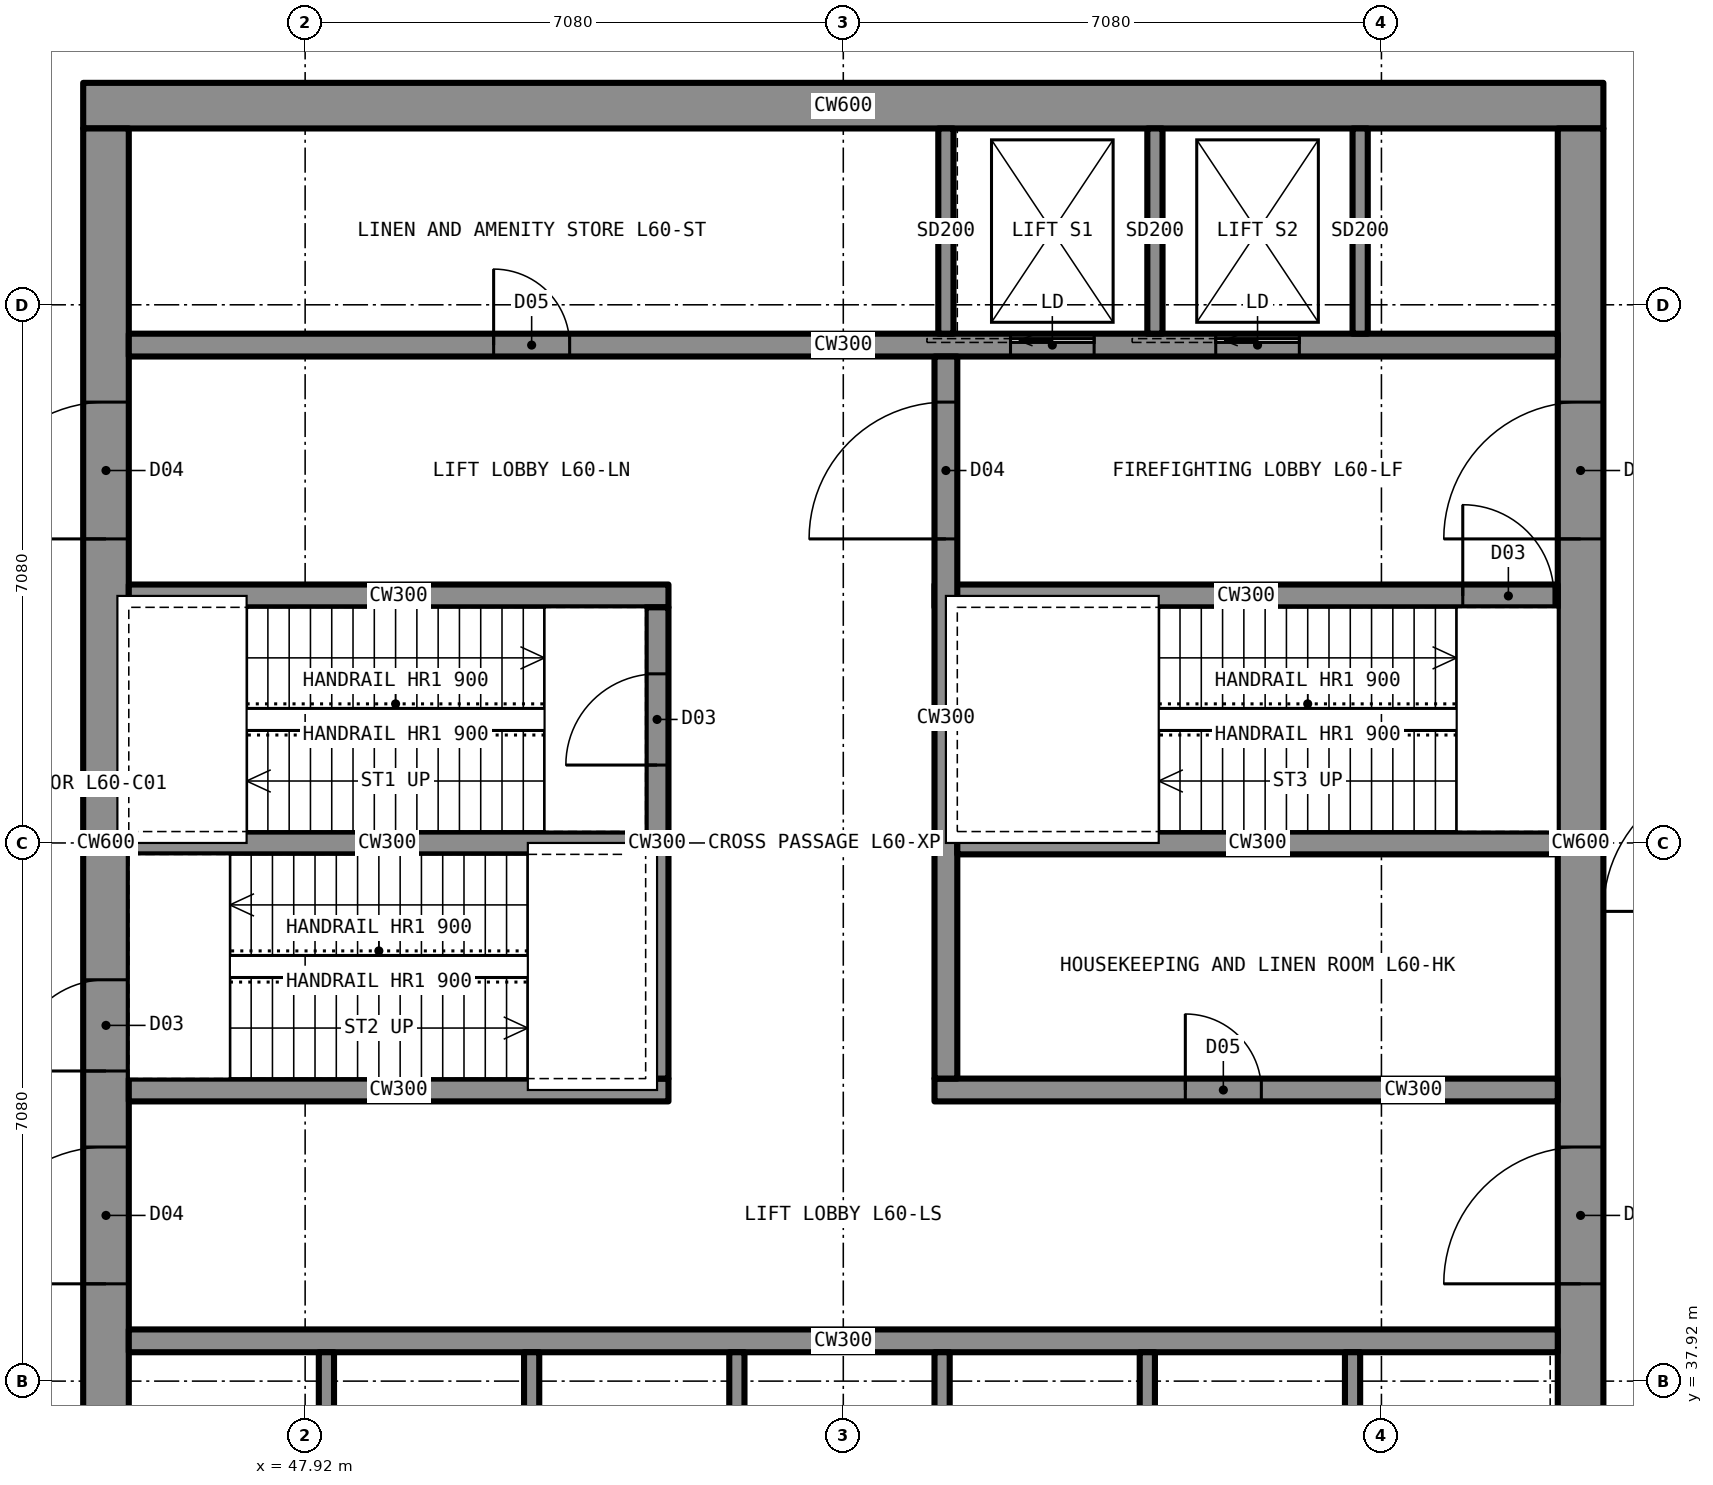
"""IFC4 building model, lengths in metres.
Left out: names, types, materials, properties, quantities, classifications, styles, units other than length and angle.
Written with IfcOpenShell. Run it as: python <this file> out.ifc"""

import sys

from ifc_helpers import new_model, si_unit, direction, frame, frame_2d, origin, place, context, subcontext, project, spatial, rectangle, extrude, element, fill, save


model = new_model("IFC4")
c1 = context("Model", 3, precision=1e-05, world=origin(), true_north=direction((0.0, 1.0)))
c2 = subcontext(c1, "Body", "Model", "MODEL_VIEW")
j1 = project(units=[si_unit("LENGTHUNIT", "METRE"), si_unit("PLANEANGLEUNIT", "RADIAN")], contexts=[c1])
p1 = place(None, origin())
s1 = spatial("IfcSite", under=j1, at=p1, CompositionType="ELEMENT")
p2 = place(p1, origin())
s2 = spatial("IfcBuilding", under=s1, at=p2, CompositionType="ELEMENT")
p3 = place(p2, frame((0.0, 0.0, 221.3)))
s3 = spatial("IfcBuildingStorey", under=s2, at=p3, CompositionType="ELEMENT", Elevation=221.3)
p4 = place(p3, frame((45.0, 54.7, 0.0), z_axis=(0.0, 0.0, 1.0), x_axis=(1.0, 0.0, 0.0)))
e1 = element("IfcWall", 1, at=p4, inside=s3, PredefinedType="SHEAR", context=c2, shape_type="SweptSolid", body=[
    extrude(rectangle(XDim=20.0, YDim=0.6, at=frame_2d((10.0, 0.0))), origin(), (0.0, 0.0, 1.0), 5.4),
])
p5 = place(p3, frame((64.7, 35.6, 0.0), z_axis=(0.0, 0.0, 1.0), x_axis=(0.0, 1.0, 0.0)))
e2 = element("IfcWall", 2, at=p5, inside=s3, PredefinedType="SHEAR", context=c2, shape_type="SweptSolid", body=[
    extrude(rectangle(XDim=18.8, YDim=0.6, at=frame_2d((9.4, 0.0))), origin(), (0.0, 0.0, 1.0), 5.4),
])
p6 = place(p5, frame((13.4, 0.0, 0.0)))
e3 = element("IfcOpeningElement", 3, at=p6, cuts=e2, PredefinedType="OPENING", context=c2, shape_type="SweptSolid", body=[
    extrude(rectangle(XDim=1.8, YDim=2.2, at=frame_2d((0.9, 1.1))), frame((0.0, 0.31, 0.0), z_axis=(0.0, -1.0, 0.0), x_axis=(1.0, 0.0, 0.0)), (0.0, 0.0, 1.0), 0.62),
])
p7 = place(p5, frame((3.6, 0.0, 0.0)))
e4 = element("IfcOpeningElement", 4, at=p7, cuts=e2, PredefinedType="OPENING", context=c2, shape_type="SweptSolid", body=[
    extrude(rectangle(XDim=1.8, YDim=2.2, at=frame_2d((0.9, 1.1))), frame((0.0, 0.31, 0.0), z_axis=(0.0, -1.0, 0.0), x_axis=(1.0, 0.0, 0.0)), (0.0, 0.0, 1.0), 0.62),
])
p8 = place(p3, frame((45.3, 35.6, 0.0), z_axis=(0.0, 0.0, 1.0), x_axis=(0.0, 1.0, 0.0)))
e5 = element("IfcWall", 5, at=p8, inside=s3, PredefinedType="SHEAR", context=c2, shape_type="SweptSolid", body=[
    extrude(rectangle(XDim=18.8, YDim=0.6, at=frame_2d((9.4, 0.0))), origin(), (0.0, 0.0, 1.0), 5.4),
])
p9 = place(p8, frame((13.4, 0.0, 0.0)))
e6 = element("IfcOpeningElement", 6, at=p9, cuts=e5, PredefinedType="OPENING", context=c2, shape_type="SweptSolid", body=[
    extrude(rectangle(XDim=1.8, YDim=2.2, at=frame_2d((0.9, 1.1))), frame((0.0, 0.31, 0.0), z_axis=(0.0, -1.0, 0.0), x_axis=(1.0, 0.0, 0.0)), (0.0, 0.0, 1.0), 0.62),
])
p10 = place(p8, frame((3.6, 0.0, 0.0)))
e7 = element("IfcOpeningElement", 7, at=p10, cuts=e5, PredefinedType="OPENING", context=c2, shape_type="SweptSolid", body=[
    extrude(rectangle(XDim=1.8, YDim=2.2, at=frame_2d((0.9, 1.1))), frame((0.0, 0.31, 0.0), z_axis=(0.0, -1.0, 0.0), x_axis=(1.0, 0.0, 0.0)), (0.0, 0.0, 1.0), 0.62),
])
p11 = place(p8, frame((6.4, 0.0, 0.0)))
e8 = element("IfcOpeningElement", 8, at=p11, cuts=e5, PredefinedType="OPENING", context=c2, shape_type="SweptSolid", body=[
    extrude(rectangle(XDim=1.2, YDim=2.2, at=frame_2d((0.6, 1.1))), frame((0.0, 0.31, 0.0), z_axis=(0.0, -1.0, 0.0), x_axis=(1.0, 0.0, 0.0)), (0.0, 0.0, 1.0), 0.62),
])
p12 = place(p3, frame((45.6, 51.55, 0.0), z_axis=(0.0, 0.0, 1.0), x_axis=(1.0, 0.0, 0.0)))
e9 = element("IfcWall", 9, at=p12, inside=s3, PredefinedType="SHEAR", context=c2, shape_type="SweptSolid", body=[
    extrude(rectangle(XDim=18.8, YDim=0.3, at=frame_2d((9.4, 0.0))), origin(), (0.0, 0.0, 1.0), 5.4),
])
p13 = place(p12, frame((4.8, 0.0, 0.0)))
e10 = element("IfcOpeningElement", 10, at=p13, cuts=e9, PredefinedType="OPENING", context=c2, shape_type="SweptSolid", body=[
    extrude(rectangle(XDim=1.0, YDim=2.1, at=frame_2d((0.5, 1.05))), frame((0.0, 0.16, 0.0), z_axis=(0.0, -1.0, 0.0), x_axis=(1.0, 0.0, 0.0)), (0.0, 0.0, 1.0), 0.32),
])
p14 = place(p12, frame((11.6, 0.0, 0.0)))
e11 = element("IfcOpeningElement", 11, at=p14, cuts=e9, PredefinedType="OPENING", context=c2, shape_type="SweptSolid", body=[
    extrude(rectangle(XDim=1.1, YDim=2.2, at=frame_2d((0.55, 1.1))), frame((0.0, 0.16, 0.0), z_axis=(0.0, -1.0, 0.0), x_axis=(1.0, 0.0, 0.0)), (0.0, 0.0, 1.0), 0.32),
])
p15 = place(p12, frame((14.3, 0.0, 0.0)))
e12 = element("IfcOpeningElement", 12, at=p15, cuts=e9, PredefinedType="OPENING", context=c2, shape_type="SweptSolid", body=[
    extrude(rectangle(XDim=1.1, YDim=2.2, at=frame_2d((0.55, 1.1))), frame((0.0, 0.16, 0.0), z_axis=(0.0, -1.0, 0.0), x_axis=(1.0, 0.0, 0.0)), (0.0, 0.0, 1.0), 0.32),
])
p16 = place(p3, frame((45.6, 38.45, 0.0), z_axis=(0.0, 0.0, 1.0), x_axis=(1.0, 0.0, 0.0)))
e13 = element("IfcWall", 13, at=p16, inside=s3, PredefinedType="SHEAR", context=c2, shape_type="SweptSolid", body=[
    extrude(rectangle(XDim=18.8, YDim=0.3, at=frame_2d((9.4, 0.0))), origin(), (0.0, 0.0, 1.0), 5.4),
])
p17 = place(p3, frame((45.6, 48.25, 0.0), z_axis=(0.0, 0.0, 1.0), x_axis=(1.0, 0.0, 0.0)))
e14 = element("IfcWall", 14, at=p17, inside=s3, PredefinedType="SHEAR", context=c2, shape_type="SweptSolid", body=[
    extrude(rectangle(XDim=7.1, YDim=0.3, at=frame_2d((3.55, 0.0))), origin(), (0.0, 0.0, 1.0), 5.4),
])
p18 = place(p3, frame((56.2, 48.25, 0.0), z_axis=(0.0, 0.0, 1.0), x_axis=(1.0, 0.0, 0.0)))
e15 = element("IfcWall", 15, at=p18, inside=s3, PredefinedType="SHEAR", context=c2, shape_type="SweptSolid", body=[
    extrude(rectangle(XDim=8.2, YDim=0.3, at=frame_2d((4.1, 0.0))), origin(), (0.0, 0.0, 1.0), 5.4),
])
p19 = place(p18, frame((6.95, 0.0, 0.0)))
e16 = element("IfcOpeningElement", 16, at=p19, cuts=e15, PredefinedType="OPENING", context=c2, shape_type="SweptSolid", body=[
    extrude(rectangle(XDim=1.2, YDim=2.2, at=frame_2d((0.6, 1.1))), frame((0.0, 0.16, 0.0), z_axis=(0.0, -1.0, 0.0), x_axis=(1.0, 0.0, 0.0)), (0.0, 0.0, 1.0), 0.32),
])
p20 = place(p3, frame((45.6, 41.75, 0.0), z_axis=(0.0, 0.0, 1.0), x_axis=(1.0, 0.0, 0.0)))
e17 = element("IfcWall", 17, at=p20, inside=s3, PredefinedType="SHEAR", context=c2, shape_type="SweptSolid", body=[
    extrude(rectangle(XDim=7.1, YDim=0.3, at=frame_2d((3.55, 0.0))), origin(), (0.0, 0.0, 1.0), 5.4),
])
p21 = place(p3, frame((56.2, 41.75, 0.0), z_axis=(0.0, 0.0, 1.0), x_axis=(1.0, 0.0, 0.0)))
e18 = element("IfcWall", 18, at=p21, inside=s3, PredefinedType="SHEAR", context=c2, shape_type="SweptSolid", body=[
    extrude(rectangle(XDim=8.2, YDim=0.3, at=frame_2d((4.1, 0.0))), origin(), (0.0, 0.0, 1.0), 5.4),
])
p22 = place(p21, frame((3.3, 0.0, 0.0)))
e19 = element("IfcOpeningElement", 19, at=p22, cuts=e18, PredefinedType="OPENING", context=c2, shape_type="SweptSolid", body=[
    extrude(rectangle(XDim=1.0, YDim=2.1, at=frame_2d((0.5, 1.05))), frame((0.0, 0.16, 0.0), z_axis=(0.0, -1.0, 0.0), x_axis=(1.0, 0.0, 0.0)), (0.0, 0.0, 1.0), 0.32),
])
p23 = place(p3, frame((52.55, 41.9, 0.0), z_axis=(0.0, 0.0, 1.0), x_axis=(0.0, 1.0, 0.0)))
e20 = element("IfcWall", 20, at=p23, inside=s3, PredefinedType="SHEAR", context=c2, shape_type="SweptSolid", body=[
    extrude(rectangle(XDim=6.2, YDim=0.3, at=frame_2d((3.1, 0.0))), origin(), (0.0, 0.0, 1.0), 5.4),
])
p24 = place(p23, frame((4.125, 0.0, 0.0)))
e21 = element("IfcOpeningElement", 21, at=p24, cuts=e20, PredefinedType="OPENING", context=c2, shape_type="SweptSolid", body=[
    extrude(rectangle(XDim=1.2, YDim=2.2, at=frame_2d((0.6, 1.1))), frame((0.0, 0.16, 0.0), z_axis=(0.0, -1.0, 0.0), x_axis=(1.0, 0.0, 0.0)), (0.0, 0.0, 1.0), 0.32),
])
p25 = place(p3, frame((56.35, 41.9, 0.0), z_axis=(0.0, 0.0, 1.0), x_axis=(0.0, 1.0, 0.0)))
e22 = element("IfcWall", 22, at=p25, inside=s3, PredefinedType="SHEAR", context=c2, shape_type="SweptSolid", body=[
    extrude(rectangle(XDim=9.5, YDim=0.3, at=frame_2d((4.75, 0.0))), origin(), (0.0, 0.0, 1.0), 5.4),
])
p26 = place(p25, frame((7.1, 0.0, 0.0)))
e23 = element("IfcOpeningElement", 23, at=p26, cuts=e22, PredefinedType="OPENING", context=c2, shape_type="SweptSolid", body=[
    extrude(rectangle(XDim=1.8, YDim=2.2, at=frame_2d((0.9, 1.1))), frame((0.0, 0.16, 0.0), z_axis=(0.0, -1.0, 0.0), x_axis=(1.0, 0.0, 0.0)), (0.0, 0.0, 1.0), 0.32),
])
p27 = place(p3, frame((45.6, 45.0, 0.0), z_axis=(0.0, 0.0, 1.0), x_axis=(1.0, 0.0, 0.0)))
e24 = element("IfcWall", 24, at=p27, inside=s3, PredefinedType="SHEAR", context=c2, shape_type="SweptSolid", body=[
    extrude(rectangle(XDim=6.8, YDim=0.3, at=frame_2d((3.4, 0.0))), origin(), (0.0, 0.0, 1.0), 5.4),
])
p28 = place(p3, frame((56.5, 45.0, 0.0), z_axis=(0.0, 0.0, 1.0), x_axis=(1.0, 0.0, 0.0)))
e25 = element("IfcWall", 25, at=p28, inside=s3, PredefinedType="SHEAR", context=c2, shape_type="SweptSolid", body=[
    extrude(rectangle(XDim=7.9, YDim=0.3, at=frame_2d((3.95, 0.0))), origin(), (0.0, 0.0, 1.0), 5.4),
])
for number, where, z_axis, x_axis in (
    (26, (59.1, 51.7, 0.0), (0.0, 0.0, 1.0), (0.0, 1.0, 0.0)),
    (27, (61.8, 51.7, 0.0), (0.0, 0.0, 1.0), (0.0, 1.0, 0.0)),
    (28, (56.35, 51.7, 0.0), (0.0, 0.0, 1.0), (0.0, 1.0, 0.0)),
    (29, (48.2, 35.6, 0.0), (0.0, 0.0, 1.0), (0.0, 1.0, 0.0)),
    (30, (50.9, 35.6, 0.0), (0.0, 0.0, 1.0), (0.0, 1.0, 0.0)),
    (31, (53.6, 35.6, 0.0), (0.0, 0.0, 1.0), (0.0, 1.0, 0.0)),
    (32, (56.3, 35.6, 0.0), (0.0, 0.0, 1.0), (0.0, 1.0, 0.0)),
    (33, (59.0, 35.6, 0.0), (0.0, 0.0, 1.0), (0.0, 1.0, 0.0)),
    (34, (61.7, 35.6, 0.0), (0.0, 0.0, 1.0), (0.0, 1.0, 0.0)),
):
    element("IfcWall", number, at=place(p3, frame(where, z_axis=z_axis, x_axis=x_axis)), inside=s3, PredefinedType="PARTITIONING", context=c2, shape_type="SweptSolid", body=[
        extrude(rectangle(XDim=2.7, YDim=0.2, at=frame_2d((1.35, 0.0))), origin(), (0.0, 0.0, 1.0), 5.23),
    ])
p29 = place(p9, origin())
e35 = element("IfcDoor", 35, at=p29, inside=s3, OperationType="DOUBLE_DOOR_SINGLE_SWING", PredefinedType="DOOR", context=c2, shape_type="SweptSolid", body=[
    extrude(rectangle(XDim=1.8, YDim=2.2, at=frame_2d((0.9, 1.1))), frame((0.0, 0.025, 0.0), z_axis=(0.0, -1.0, 0.0), x_axis=(1.0, 0.0, 0.0)), (0.0, 0.0, 1.0), 0.05),
])
fill(e6, e35)
p30 = place(p10, origin())
e36 = element("IfcDoor", 36, at=p30, inside=s3, OperationType="DOUBLE_DOOR_SINGLE_SWING", PredefinedType="DOOR", context=c2, shape_type="SweptSolid", body=[
    extrude(rectangle(XDim=1.8, YDim=2.2, at=frame_2d((0.9, 1.1))), frame((0.0, 0.025, 0.0), z_axis=(0.0, -1.0, 0.0), x_axis=(1.0, 0.0, 0.0)), (0.0, 0.0, 1.0), 0.05),
])
fill(e7, e36)
p31 = place(p6, origin())
e37 = element("IfcDoor", 37, at=p31, inside=s3, OperationType="DOUBLE_DOOR_SINGLE_SWING", PredefinedType="DOOR", context=c2, shape_type="SweptSolid", body=[
    extrude(rectangle(XDim=1.8, YDim=2.2, at=frame_2d((0.9, 1.1))), frame((0.0, 0.025, 0.0), z_axis=(0.0, -1.0, 0.0), x_axis=(1.0, 0.0, 0.0)), (0.0, 0.0, 1.0), 0.05),
])
fill(e3, e37)
p32 = place(p7, origin())
e38 = element("IfcDoor", 38, at=p32, inside=s3, OperationType="DOUBLE_DOOR_SINGLE_SWING", PredefinedType="DOOR", context=c2, shape_type="SweptSolid", body=[
    extrude(rectangle(XDim=1.8, YDim=2.2, at=frame_2d((0.9, 1.1))), frame((0.0, 0.025, 0.0), z_axis=(0.0, -1.0, 0.0), x_axis=(1.0, 0.0, 0.0)), (0.0, 0.0, 1.0), 0.05),
])
fill(e4, e38)
p33 = place(p26, origin())
e39 = element("IfcDoor", 39, at=p33, inside=s3, OperationType="DOUBLE_DOOR_SINGLE_SWING", PredefinedType="DOOR", context=c2, shape_type="SweptSolid", body=[
    extrude(rectangle(XDim=1.8, YDim=2.2, at=frame_2d((0.9, 1.1))), frame((0.0, 0.025, 0.0), z_axis=(0.0, -1.0, 0.0), x_axis=(1.0, 0.0, 0.0)), (0.0, 0.0, 1.0), 0.05),
])
fill(e23, e39)
p34 = place(p24, origin())
e40 = element("IfcDoor", 40, at=p34, inside=s3, OperationType="SINGLE_SWING_LEFT", PredefinedType="DOOR", context=c2, shape_type="SweptSolid", body=[
    extrude(rectangle(XDim=1.2, YDim=2.2, at=frame_2d((0.6, 1.1))), frame((0.0, 0.025, 0.0), z_axis=(0.0, -1.0, 0.0), x_axis=(1.0, 0.0, 0.0)), (0.0, 0.0, 1.0), 0.05),
])
fill(e21, e40)
p35 = place(p11, origin())
e41 = element("IfcDoor", 41, at=p35, inside=s3, OperationType="SINGLE_SWING_LEFT", PredefinedType="DOOR", context=c2, shape_type="SweptSolid", body=[
    extrude(rectangle(XDim=1.2, YDim=2.2, at=frame_2d((0.6, 1.1))), frame((0.0, 0.025, 0.0), z_axis=(0.0, -1.0, 0.0), x_axis=(1.0, 0.0, 0.0)), (0.0, 0.0, 1.0), 0.05),
])
fill(e8, e41)
p36 = place(p19, origin())
e42 = element("IfcDoor", 42, at=p36, inside=s3, OperationType="SINGLE_SWING_LEFT", PredefinedType="DOOR", context=c2, shape_type="SweptSolid", body=[
    extrude(rectangle(XDim=1.2, YDim=2.2, at=frame_2d((0.6, 1.1))), frame((0.0, 0.025, 0.0), z_axis=(0.0, -1.0, 0.0), x_axis=(1.0, 0.0, 0.0)), (0.0, 0.0, 1.0), 0.05),
])
fill(e16, e42)
p37 = place(p22, origin())
e43 = element("IfcDoor", 43, at=p37, inside=s3, OperationType="SINGLE_SWING_LEFT", PredefinedType="DOOR", context=c2, shape_type="SweptSolid", body=[
    extrude(rectangle(XDim=1.0, YDim=2.1, at=frame_2d((0.5, 1.05))), frame((0.0, 0.025, 0.0), z_axis=(0.0, -1.0, 0.0), x_axis=(1.0, 0.0, 0.0)), (0.0, 0.0, 1.0), 0.05),
])
fill(e19, e43)
p38 = place(p13, origin())
e44 = element("IfcDoor", 44, at=p38, inside=s3, OperationType="SINGLE_SWING_LEFT", PredefinedType="DOOR", context=c2, shape_type="SweptSolid", body=[
    extrude(rectangle(XDim=1.0, YDim=2.1, at=frame_2d((0.5, 1.05))), frame((0.0, 0.025, 0.0), z_axis=(0.0, -1.0, 0.0), x_axis=(1.0, 0.0, 0.0)), (0.0, 0.0, 1.0), 0.05),
])
fill(e10, e44)
p39 = place(p14, origin())
e45 = element("IfcDoor", 45, at=p39, inside=s3, OperationType="SLIDING_TO_LEFT", PredefinedType="DOOR", context=c2, shape_type="SweptSolid", body=[
    extrude(rectangle(XDim=1.1, YDim=2.2, at=frame_2d((0.55, 1.1))), frame((0.0, 0.025, 0.0), z_axis=(0.0, -1.0, 0.0), x_axis=(1.0, 0.0, 0.0)), (0.0, 0.0, 1.0), 0.05),
])
fill(e11, e45)
p40 = place(p15, origin())
e46 = element("IfcDoor", 46, at=p40, inside=s3, OperationType="SLIDING_TO_LEFT", PredefinedType="DOOR", context=c2, shape_type="SweptSolid", body=[
    extrude(rectangle(XDim=1.1, YDim=2.2, at=frame_2d((0.55, 1.1))), frame((0.0, 0.025, 0.0), z_axis=(0.0, -1.0, 0.0), x_axis=(1.0, 0.0, 0.0)), (0.0, 0.0, 1.0), 0.05),
])
fill(e12, e46)
save(model, sys.argv[1])
